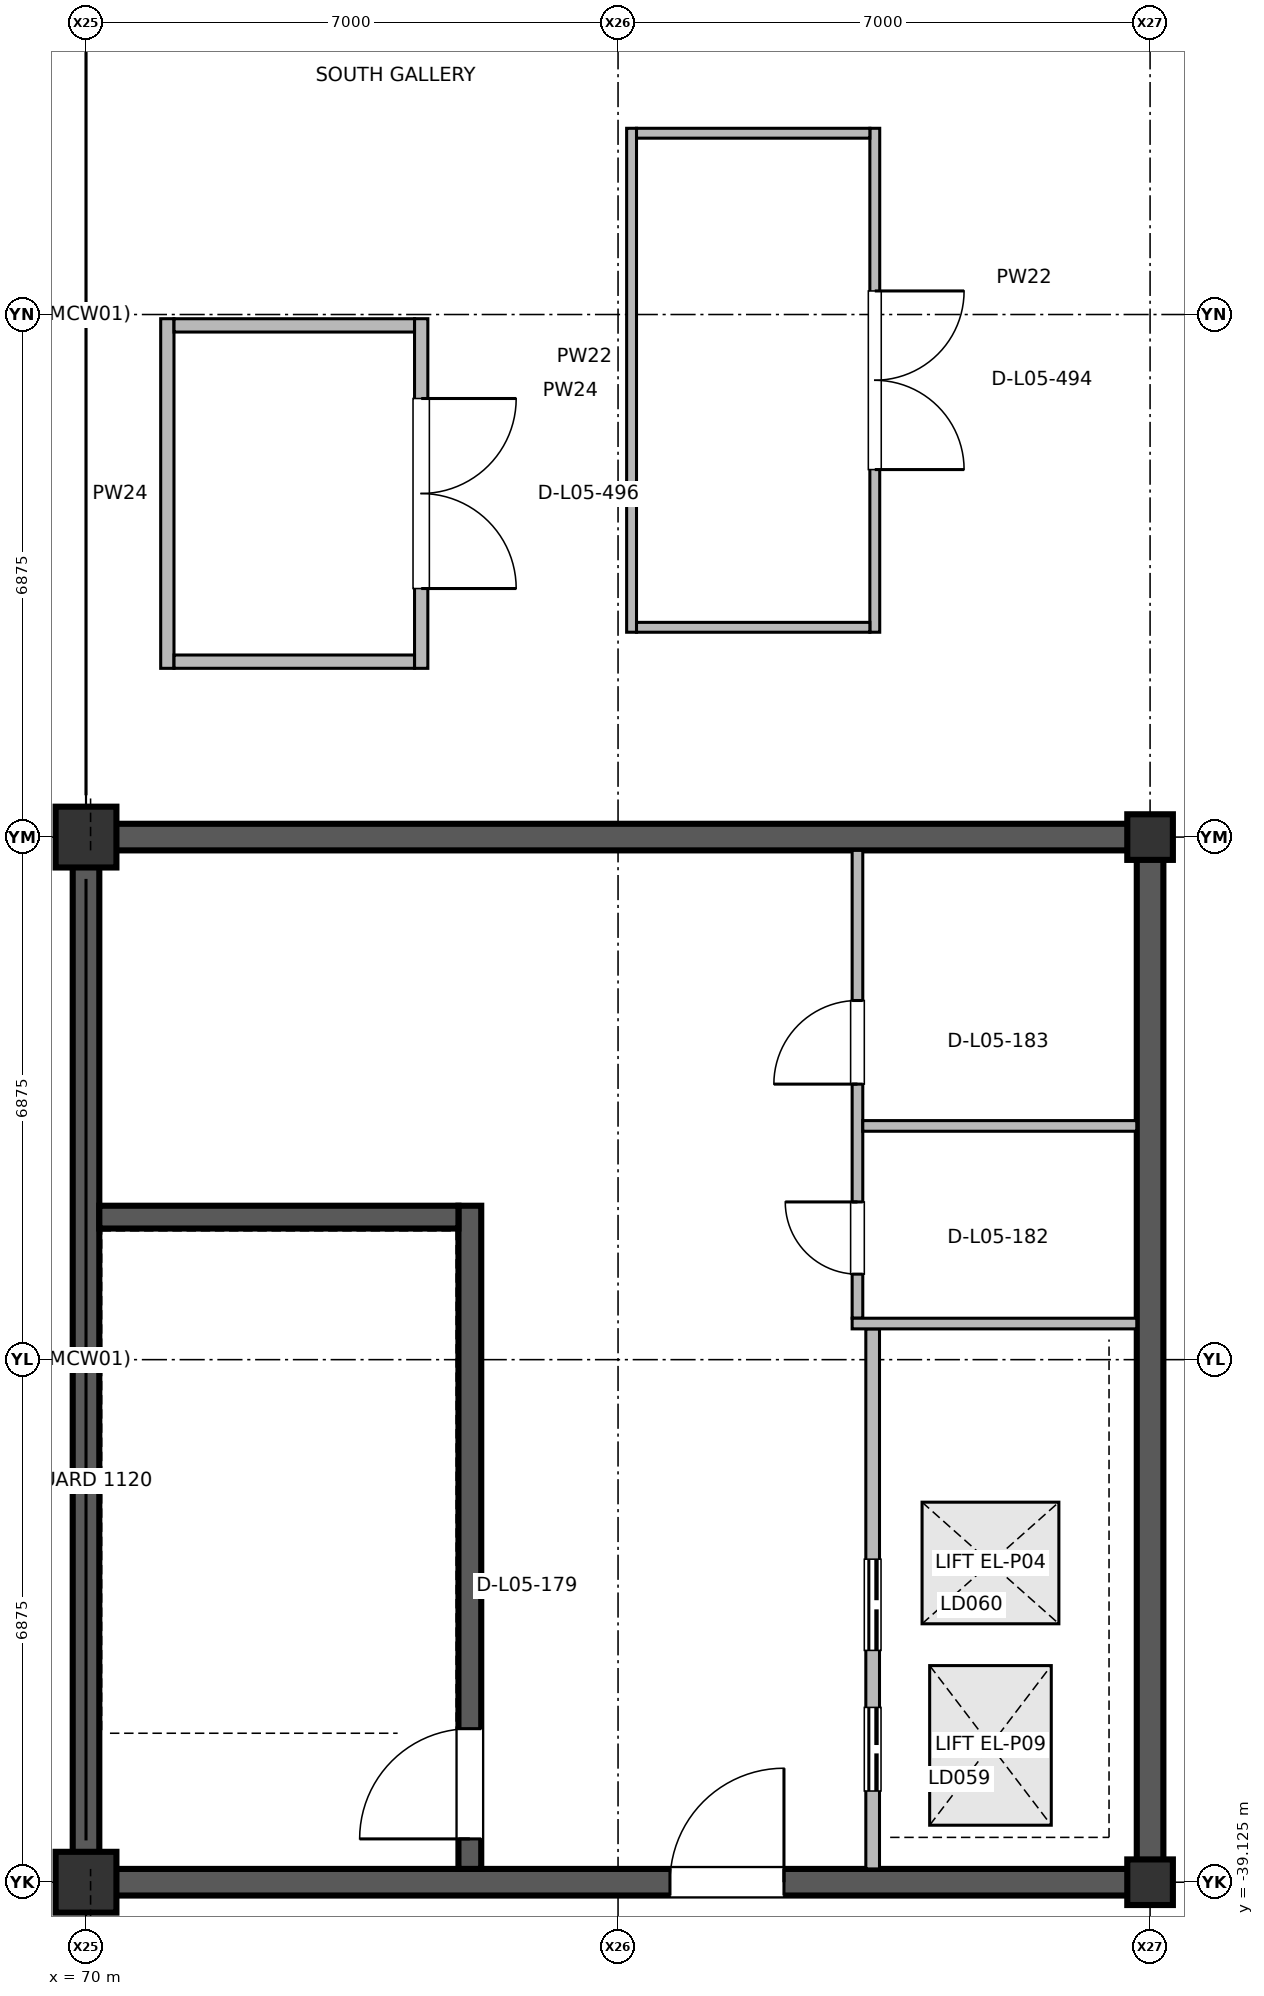
"""IFC4 building model, lengths in metres.
Left out: names, types, materials, properties, quantities, classifications, styles, units other than length and angle.
Written with IfcOpenShell. Run it as: python <this file> out.ifc"""

import sys

from ifc_helpers import new_model, si_unit, direction, frame, frame_2d, origin, origin_2d, place, context, subcontext, project, spatial, rectangle, extrude, element, fill, save


model = new_model("IFC4")
c1 = context("Model", 3, precision=1e-05, world=origin(), true_north=direction((0.0, 1.0)))
c2 = subcontext(c1, "Body", "Model", "MODEL_VIEW")
j1 = project(units=[si_unit("LENGTHUNIT", "METRE"), si_unit("PLANEANGLEUNIT", "RADIAN")], contexts=[c1])
p1 = place(None, origin())
s1 = spatial("IfcSite", under=j1, at=p1, CompositionType="ELEMENT")
p2 = place(p1, origin())
s2 = spatial("IfcBuilding", under=s1, at=p2, CompositionType="ELEMENT")
p3 = place(p2, frame((0.0, 0.0, 21.0)))
s3 = spatial("IfcBuildingStorey", under=s2, at=p3, CompositionType="ELEMENT", Elevation=21.0)
for number, where, z_axis, x_axis in (
    (1, (70.0, -39.125, 0.0), (0.0, 0.0, 1.0), (1.0, 0.0, 0.0)),
    (2, (70.0, -25.375, 0.0), (0.0, 0.0, 1.0), (1.0, 0.0, 0.0)),
):
    element("IfcColumn", number, at=place(p3, frame(where, z_axis=z_axis, x_axis=x_axis)), inside=s3, PredefinedType="COLUMN", context=c2, shape_type="SweptSolid", body=[
        extrude(rectangle(XDim=0.8, YDim=0.8, at=origin_2d()), origin(), (0.0, 0.0, 1.0), 5.185),
    ])
for number, where, z_axis, x_axis in (
    (3, (84.0, -39.125, 0.0), (0.0, 0.0, 1.0), (1.0, 0.0, 0.0)),
    (4, (84.0, -25.375, 0.0), (0.0, 0.0, 1.0), (1.0, 0.0, 0.0)),
):
    element("IfcColumn", number, at=place(p3, frame(where, z_axis=z_axis, x_axis=x_axis)), inside=s3, PredefinedType="COLUMN", context=c2, shape_type="SweptSolid", body=[
        extrude(rectangle(XDim=0.6, YDim=0.6, at=origin_2d()), origin(), (0.0, 0.0, 1.0), 5.185),
    ])
for number, where, z_axis, x_axis in (
    (5, (70.0, -38.95, 0.0), (0.0, 0.0, 1.0), (0.0, 1.0, 0.0)),
    (6, (84.0, -38.95, 0.0), (0.0, 0.0, 1.0), (0.0, 1.0, 0.0)),
):
    element("IfcWall", number, at=place(p3, frame(where, z_axis=z_axis, x_axis=x_axis)), inside=s3, PredefinedType="SHEAR", context=c2, shape_type="SweptSolid", body=[
        extrude(rectangle(XDim=13.4, YDim=0.35, at=frame_2d((6.7, 0.0))), origin(), (0.0, 0.0, 1.0), 5.185),
    ])
p4 = place(p3, frame((70.175, -39.125, 0.0), z_axis=(0.0, 0.0, 1.0), x_axis=(1.0, 0.0, 0.0)))
e7 = element("IfcWall", 7, at=p4, inside=s3, PredefinedType="SHEAR", context=c2, shape_type="SweptSolid", body=[
    extrude(rectangle(XDim=13.65, YDim=0.35, at=frame_2d((6.825, 0.0))), origin(), (0.0, 0.0, 1.0), 5.185),
])
p5 = place(p4, frame((7.508, 0.0, 0.0)))
e8 = element("IfcOpeningElement", 8, at=p5, cuts=e7, PredefinedType="OPENING", context=c2, shape_type="SweptSolid", body=[
    extrude(rectangle(XDim=1.5, YDim=2.2, at=frame_2d((0.75, 1.1))), frame((0.0, 0.185, 0.0), z_axis=(0.0, -1.0, 0.0), x_axis=(1.0, 0.0, 0.0)), (0.0, 0.0, 1.0), 0.37),
])
p6 = place(p3, frame((70.175, -25.375, 0.0), z_axis=(0.0, 0.0, 1.0), x_axis=(1.0, 0.0, 0.0)))
e9 = element("IfcWall", 9, at=p6, inside=s3, PredefinedType="SHEAR", context=c2, shape_type="SweptSolid", body=[
    extrude(rectangle(XDim=13.65, YDim=0.35, at=frame_2d((6.825, 0.0))), origin(), (0.0, 0.0, 1.0), 5.185),
])
p7 = place(p3, frame((75.05, -38.95, 0.0), z_axis=(0.0, 0.0, 1.0), x_axis=(0.0, 1.0, 0.0)))
e10 = element("IfcWall", 10, at=p7, inside=s3, PredefinedType="SHEAR", context=c2, shape_type="SweptSolid", body=[
    extrude(rectangle(XDim=8.725, YDim=0.3, at=frame_2d((4.362, 0.0))), origin(), (0.0, 0.0, 1.0), 5.185),
])
p8 = place(p7, frame((0.395, 0.0, 0.0)))
e11 = element("IfcOpeningElement", 11, at=p8, cuts=e10, PredefinedType="OPENING", context=c2, shape_type="SweptSolid", body=[
    extrude(rectangle(XDim=1.45, YDim=2.2, at=frame_2d((0.725, 1.1))), frame((0.0, 0.16, 0.0), z_axis=(0.0, -1.0, 0.0), x_axis=(1.0, 0.0, 0.0)), (0.0, 0.0, 1.0), 0.32),
])
p9 = place(p3, frame((80.35, -38.95, 0.0), z_axis=(0.0, 0.0, 1.0), x_axis=(0.0, 1.0, 0.0)))
e12 = element("IfcWall", 12, at=p9, inside=s3, PredefinedType="PARTITIONING", context=c2, shape_type="SweptSolid", body=[
    extrude(rectangle(XDim=7.105, YDim=0.18, at=frame_2d((3.552, 0.0))), origin(), (0.0, 0.0, 1.0), 4.42),
])
p10 = place(p9, frame((1.025, 0.0, 0.0)))
e13 = element("IfcOpeningElement", 13, at=p10, cuts=e12, PredefinedType="OPENING", context=c2, shape_type="SweptSolid", body=[
    extrude(rectangle(XDim=1.1, YDim=2.2, at=frame_2d((0.55, 1.1))), frame((0.0, 0.1, 0.0), z_axis=(0.0, -1.0, 0.0), x_axis=(1.0, 0.0, 0.0)), (0.0, 0.0, 1.0), 0.2),
])
p11 = place(p9, frame((2.875, 0.0, 0.0)))
e14 = element("IfcOpeningElement", 14, at=p11, cuts=e12, PredefinedType="OPENING", context=c2, shape_type="SweptSolid", body=[
    extrude(rectangle(XDim=1.2, YDim=2.25, at=frame_2d((0.6, 1.125))), frame((0.0, 0.1, 0.0), z_axis=(0.0, -1.0, 0.0), x_axis=(1.0, 0.0, 0.0)), (0.0, 0.0, 1.0), 0.2),
])
p12 = place(p3, frame((80.15, -31.705, 0.0), z_axis=(0.0, 0.0, 1.0), x_axis=(0.0, 1.0, 0.0)))
e15 = element("IfcWall", 15, at=p12, inside=s3, PredefinedType="PARTITIONING", context=c2, shape_type="SweptSolid", body=[
    extrude(rectangle(XDim=6.155, YDim=0.14, at=frame_2d((3.078, 0.0))), origin(), (0.0, 0.0, 1.0), 4.42),
])
p13 = place(p12, frame((0.58, 0.0, 0.0)))
e16 = element("IfcOpeningElement", 16, at=p13, cuts=e15, PredefinedType="OPENING", context=c2, shape_type="SweptSolid", body=[
    extrude(rectangle(XDim=0.95, YDim=2.15, at=frame_2d((0.475, 1.075))), frame((0.0, 0.08, 0.0), z_axis=(0.0, -1.0, 0.0), x_axis=(1.0, 0.0, 0.0)), (0.0, 0.0, 1.0), 0.16),
])
p14 = place(p12, frame((3.08, 0.0, 0.0)))
e17 = element("IfcOpeningElement", 17, at=p14, cuts=e15, PredefinedType="OPENING", context=c2, shape_type="SweptSolid", body=[
    extrude(rectangle(XDim=1.1, YDim=2.15, at=frame_2d((0.55, 1.075))), frame((0.0, 0.08, 0.0), z_axis=(0.0, -1.0, 0.0), x_axis=(1.0, 0.0, 0.0)), (0.0, 0.0, 1.0), 0.16),
])
p15 = place(p3, frame((80.378, -16.05, 0.0), z_axis=(0.0, 0.0, 1.0), x_axis=(0.0, -1.0, 0.0)))
e18 = element("IfcWall", 18, at=p15, inside=s3, PredefinedType="PARTITIONING", context=c2, shape_type="SweptSolid", body=[
    extrude(rectangle(XDim=6.63, YDim=0.13, at=frame_2d((3.315, 0.0))), origin(), (0.0, 0.0, 1.0), 4.42),
])
p16 = place(p15, frame((2.14, 0.0, 0.0)))
e19 = element("IfcOpeningElement", 19, at=p16, cuts=e18, PredefinedType="OPENING", context=c2, shape_type="SweptSolid", body=[
    extrude(rectangle(XDim=2.35, YDim=2.5, at=frame_2d((1.175, 1.25))), frame((0.0, 0.075, 0.0), z_axis=(0.0, -1.0, 0.0), x_axis=(1.0, 0.0, 0.0)), (0.0, 0.0, 1.0), 0.15),
])
p17 = place(p3, frame((74.41, -18.555, 0.0), z_axis=(0.0, 0.0, 1.0), x_axis=(0.0, -1.0, 0.0)))
e20 = element("IfcWall", 20, at=p17, inside=s3, PredefinedType="PARTITIONING", context=c2, shape_type="SweptSolid", body=[
    extrude(rectangle(XDim=4.6, YDim=0.175, at=frame_2d((2.3, 0.0))), origin(), (0.0, 0.0, 1.0), 4.42),
])
p18 = place(p17, frame((1.05, 0.0, 0.0)))
e21 = element("IfcOpeningElement", 21, at=p18, cuts=e20, PredefinedType="OPENING", context=c2, shape_type="SweptSolid", body=[
    extrude(rectangle(XDim=2.5, YDim=2.5, at=frame_2d((1.25, 1.25))), frame((0.0, 0.097, 0.0), z_axis=(0.0, -1.0, 0.0), x_axis=(1.0, 0.0, 0.0)), (0.0, 0.0, 1.0), 0.195),
])
p19 = place(p3, frame((80.08, -31.775, 0.0), z_axis=(0.0, 0.0, 1.0), x_axis=(1.0, 0.0, 0.0)))
e22 = element("IfcWall", 22, at=p19, inside=s3, PredefinedType="PARTITIONING", context=c2, shape_type="SweptSolid", body=[
    extrude(rectangle(XDim=3.745, YDim=0.14, at=frame_2d((1.873, 0.0))), origin(), (0.0, 0.0, 1.0), 4.42),
])
p20 = place(p3, frame((80.22, -29.175, 0.0), z_axis=(0.0, 0.0, 1.0), x_axis=(1.0, 0.0, 0.0)))
e23 = element("IfcWall", 23, at=p20, inside=s3, PredefinedType="PARTITIONING", context=c2, shape_type="SweptSolid", body=[
    extrude(rectangle(XDim=3.605, YDim=0.14, at=frame_2d((1.802, 0.0))), origin(), (0.0, 0.0, 1.0), 4.42),
])
p21 = place(p3, frame((77.178, -22.68, 0.0), z_axis=(0.0, 0.0, 1.0), x_axis=(0.0, 1.0, 0.0)))
e24 = element("IfcWall", 24, at=p21, inside=s3, PredefinedType="PARTITIONING", context=c2, shape_type="SweptSolid", body=[
    extrude(rectangle(XDim=6.63, YDim=0.13, at=frame_2d((3.315, 0.0))), origin(), (0.0, 0.0, 1.0), 4.42),
])
for number, where, z_axis, x_axis in (
    (25, (77.243, -22.615, 0.0), (0.0, 0.0, 1.0), (1.0, 0.0, 0.0)),
    (26, (77.243, -16.115, 0.0), (0.0, 0.0, 1.0), (1.0, 0.0, 0.0)),
):
    element("IfcWall", number, at=place(p3, frame(where, z_axis=z_axis, x_axis=x_axis)), inside=s3, PredefinedType="PARTITIONING", context=c2, shape_type="SweptSolid", body=[
        extrude(rectangle(XDim=3.07, YDim=0.13, at=frame_2d((1.535, 0.0))), origin(), (0.0, 0.0, 1.0), 4.42),
    ])
p22 = place(p3, frame((71.07, -23.155, 0.0), z_axis=(0.0, 0.0, 1.0), x_axis=(0.0, 1.0, 0.0)))
e27 = element("IfcWall", 27, at=p22, inside=s3, PredefinedType="PARTITIONING", context=c2, shape_type="SweptSolid", body=[
    extrude(rectangle(XDim=4.6, YDim=0.175, at=frame_2d((2.3, 0.0))), origin(), (0.0, 0.0, 1.0), 4.42),
])
for number, where, z_axis, x_axis in (
    (28, (71.158, -23.067, 0.0), (0.0, 0.0, 1.0), (1.0, 0.0, 0.0)),
    (29, (71.158, -18.643, 0.0), (0.0, 0.0, 1.0), (1.0, 0.0, 0.0)),
):
    element("IfcWall", number, at=place(p3, frame(where, z_axis=z_axis, x_axis=x_axis)), inside=s3, PredefinedType="PARTITIONING", context=c2, shape_type="SweptSolid", body=[
        extrude(rectangle(XDim=3.164, YDim=0.175, at=frame_2d((1.582, 0.0))), origin(), (0.0, 0.0, 1.0), 4.42),
    ])
p23 = place(p3, frame((70.175, -30.375, 0.0), z_axis=(0.0, 0.0, 1.0), x_axis=(1.0, 0.0, 0.0)))
e30 = element("IfcWall", 30, at=p23, inside=s3, PredefinedType="SHEAR", context=c2, shape_type="SweptSolid", body=[
    extrude(rectangle(XDim=4.725, YDim=0.3, at=frame_2d((2.362, 0.0))), origin(), (0.0, 0.0, 1.0), 5.185),
])
p24 = place(p5, origin())
e31 = element("IfcDoor", 31, at=p24, inside=s3, OperationType="SINGLE_SWING_RIGHT", PredefinedType="DOOR", context=c2, shape_type="SweptSolid", body=[
    extrude(rectangle(XDim=1.5, YDim=2.2, at=frame_2d((0.75, 1.1))), frame((0.0, 0.025, 0.0), z_axis=(0.0, -1.0, 0.0), x_axis=(1.0, 0.0, 0.0)), (0.0, 0.0, 1.0), 0.05),
])
fill(e8, e31)
p25 = place(p8, origin())
e32 = element("IfcDoor", 32, at=p25, inside=s3, OperationType="SINGLE_SWING_LEFT", PredefinedType="DOOR", context=c2, shape_type="SweptSolid", body=[
    extrude(rectangle(XDim=1.45, YDim=2.2, at=frame_2d((0.725, 1.1))), frame((0.0, 0.025, 0.0), z_axis=(0.0, -1.0, 0.0), x_axis=(1.0, 0.0, 0.0)), (0.0, 0.0, 1.0), 0.05),
])
fill(e11, e32)
p26 = place(p10, origin())
e33 = element("IfcDoor", 33, at=p26, inside=s3, OperationType="DOUBLE_DOOR_SLIDING", PredefinedType="DOOR", context=c2, shape_type="SweptSolid", body=[
    extrude(rectangle(XDim=1.1, YDim=2.2, at=frame_2d((0.55, 1.1))), frame((0.0, 0.025, 0.0), z_axis=(0.0, -1.0, 0.0), x_axis=(1.0, 0.0, 0.0)), (0.0, 0.0, 1.0), 0.05),
])
fill(e13, e33)
p27 = place(p11, origin())
e34 = element("IfcDoor", 34, at=p27, inside=s3, OperationType="DOUBLE_DOOR_SLIDING", PredefinedType="DOOR", context=c2, shape_type="SweptSolid", body=[
    extrude(rectangle(XDim=1.2, YDim=2.25, at=frame_2d((0.6, 1.125))), frame((0.0, 0.025, 0.0), z_axis=(0.0, -1.0, 0.0), x_axis=(1.0, 0.0, 0.0)), (0.0, 0.0, 1.0), 0.05),
])
fill(e14, e34)
p28 = place(p13, origin())
e35 = element("IfcDoor", 35, at=p28, inside=s3, OperationType="SINGLE_SWING_RIGHT", PredefinedType="DOOR", context=c2, shape_type="SweptSolid", body=[
    extrude(rectangle(XDim=0.95, YDim=2.15, at=frame_2d((0.475, 1.075))), frame((0.0, 0.025, 0.0), z_axis=(0.0, -1.0, 0.0), x_axis=(1.0, 0.0, 0.0)), (0.0, 0.0, 1.0), 0.05),
])
fill(e16, e35)
p29 = place(p14, origin())
e36 = element("IfcDoor", 36, at=p29, inside=s3, OperationType="SINGLE_SWING_LEFT", PredefinedType="DOOR", context=c2, shape_type="SweptSolid", body=[
    extrude(rectangle(XDim=1.1, YDim=2.15, at=frame_2d((0.55, 1.075))), frame((0.0, 0.025, 0.0), z_axis=(0.0, -1.0, 0.0), x_axis=(1.0, 0.0, 0.0)), (0.0, 0.0, 1.0), 0.05),
])
fill(e17, e36)
p30 = place(p16, origin())
e37 = element("IfcDoor", 37, at=p30, inside=s3, OperationType="DOUBLE_DOOR_SINGLE_SWING", PredefinedType="DOOR", context=c2, shape_type="SweptSolid", body=[
    extrude(rectangle(XDim=2.35, YDim=2.5, at=frame_2d((1.175, 1.25))), frame((0.0, 0.025, 0.0), z_axis=(0.0, -1.0, 0.0), x_axis=(1.0, 0.0, 0.0)), (0.0, 0.0, 1.0), 0.05),
])
fill(e19, e37)
p31 = place(p18, origin())
e38 = element("IfcDoor", 38, at=p31, inside=s3, OperationType="DOUBLE_DOOR_SINGLE_SWING", PredefinedType="DOOR", context=c2, shape_type="SweptSolid", body=[
    extrude(rectangle(XDim=2.5, YDim=2.5, at=frame_2d((1.25, 1.25))), frame((0.0, 0.025, 0.0), z_axis=(0.0, -1.0, 0.0), x_axis=(1.0, 0.0, 0.0)), (0.0, 0.0, 1.0), 0.05),
])
fill(e21, e38)
save(model, sys.argv[1])
